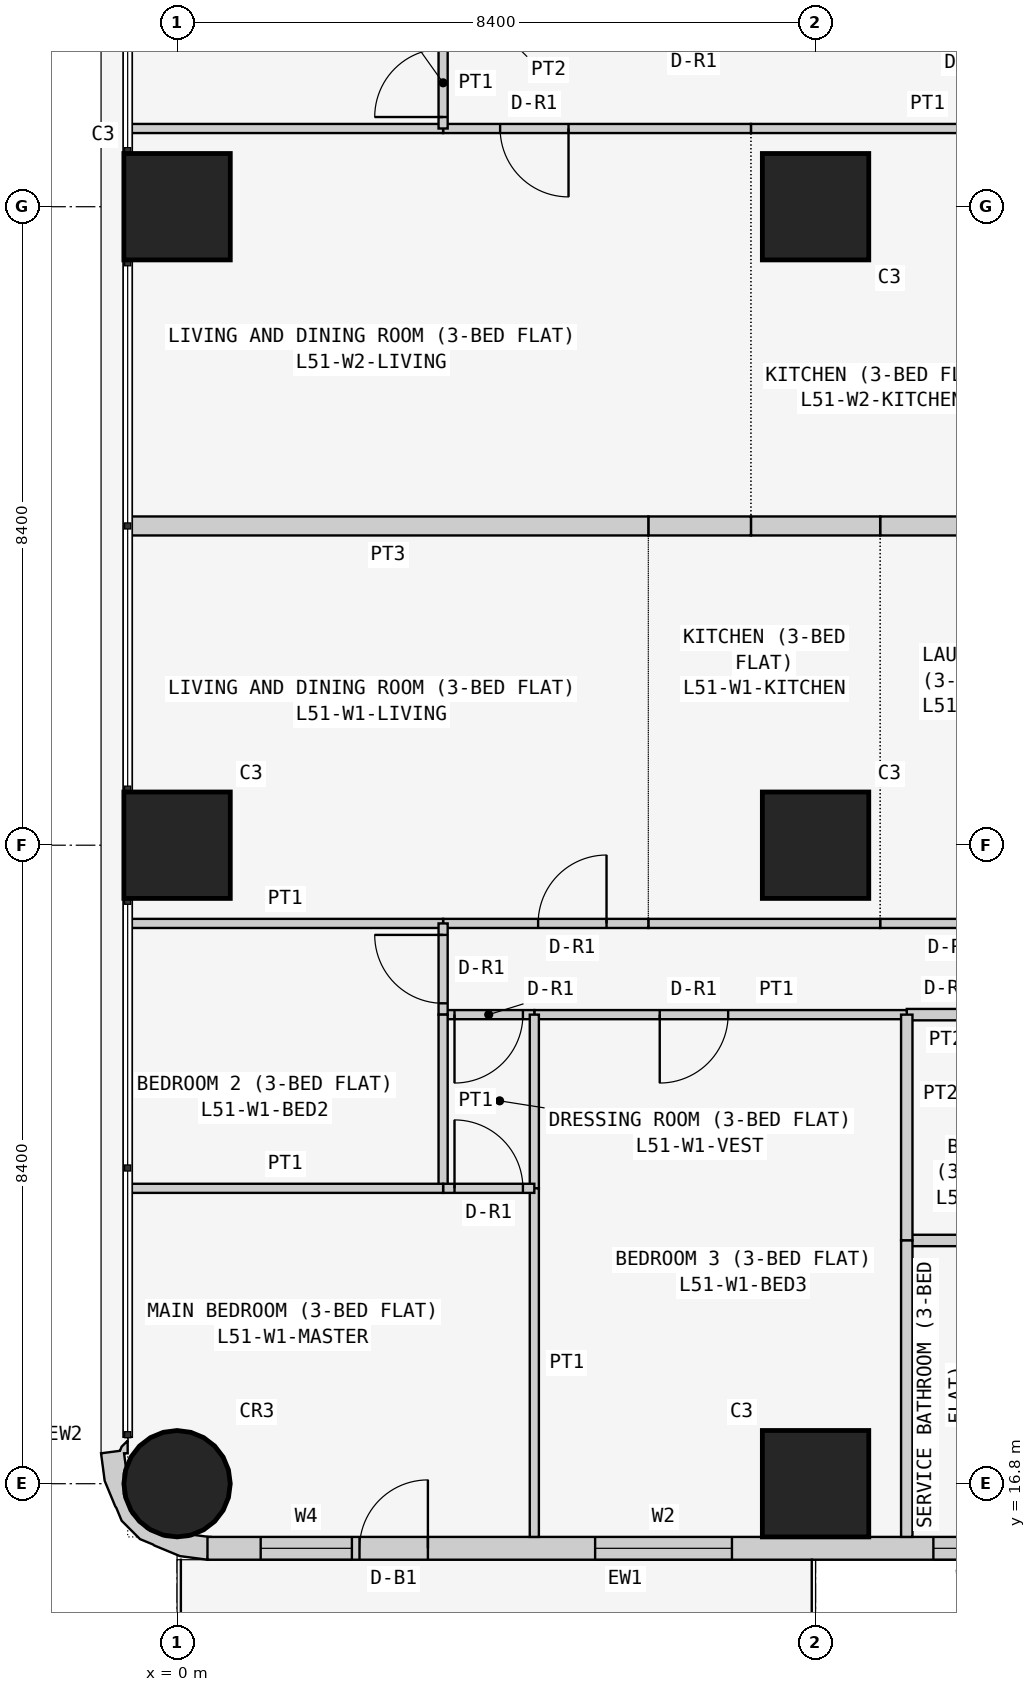
"""IFC4 building model, lengths in metres.
Left out: names, types, materials, properties, quantities, classifications, styles, units other than length and angle.
Written with IfcOpenShell. Run it as: python <this file> out.ifc"""

import sys

from ifc_helpers import new_model, si_unit, direction, frame, frame_2d, origin, origin_2d, place, context, subcontext, project, spatial, polyline, rectangle, circle, outline, extrude, element, fill, save


model = new_model("IFC4")
c1 = context("Model", 3, precision=1e-05, world=origin(), true_north=direction((0.0, 1.0)))
c2 = subcontext(c1, "Body", "Model", "MODEL_VIEW")
j1 = project(units=[si_unit("LENGTHUNIT", "METRE"), si_unit("PLANEANGLEUNIT", "RADIAN")], contexts=[c1])
p1 = place(None, origin())
s1 = spatial("IfcSite", under=j1, at=p1, CompositionType="ELEMENT")
p2 = place(p1, origin())
s2 = spatial("IfcBuilding", under=s1, at=p2, CompositionType="ELEMENT")
p3 = place(p2, frame((0.0, 0.0, 197.7)))
s3 = spatial("IfcBuildingStorey", under=s2, at=p3, CompositionType="ELEMENT", Elevation=197.7)
p4 = place(p3, frame((0.0, 16.8, 0.0), z_axis=(0.0, 0.0, 1.0), x_axis=(1.0, 0.0, 0.0)))
e1 = element("IfcColumn", 1, at=p4, inside=s3, PredefinedType="COLUMN", context=c2, shape_type="SweptSolid", body=[
    extrude(circle(Radius=0.7, at=origin_2d()), origin(), (0.0, 0.0, 1.0), 3.6),
])
for number, where, z_axis, x_axis in (
    (2, (0.0, 25.2, 0.0), (0.0, 0.0, 1.0), (1.0, 0.0, 0.0)),
    (3, (0.0, 33.6, 0.0), (0.0, 0.0, 1.0), (1.0, 0.0, 0.0)),
    (4, (8.4, 16.8, 0.0), (0.0, 0.0, 1.0), (1.0, 0.0, 0.0)),
    (5, (8.4, 25.2, 0.0), (0.0, 0.0, 1.0), (1.0, 0.0, 0.0)),
    (6, (8.4, 33.6, 0.0), (0.0, 0.0, 1.0), (1.0, 0.0, 0.0)),
):
    element("IfcColumn", number, at=place(p3, frame(where, z_axis=z_axis, x_axis=x_axis)), inside=s3, PredefinedType="COLUMN", context=c2, shape_type="SweptSolid", body=[
        extrude(rectangle(XDim=1.4, YDim=1.4, at=origin_2d()), origin(), (0.0, 0.0, 1.0), 3.6),
    ])
p5 = place(p3, frame((0.4, 15.95, 0.0), z_axis=(0.0, 0.0, 1.0), x_axis=(1.0, 0.0, 0.0)))
e7 = element("IfcWall", 7, at=p5, inside=s3, PredefinedType="SOLIDWALL", context=c2, shape_type="SweptSolid", body=[
    extrude(rectangle(XDim=15.7, YDim=0.3, at=frame_2d((7.85, 0.0))), origin(), (0.0, 0.0, 1.0), 3.45),
])
p6 = place(p5, frame((12.4, 0.0, 0.9)))
e8 = element("IfcOpeningElement", 8, at=p6, cuts=e7, PredefinedType="OPENING", context=c2, shape_type="SweptSolid", body=[
    extrude(rectangle(XDim=1.8, YDim=1.5, at=frame_2d((0.9, 0.75))), frame((0.0, 0.16, 0.0), z_axis=(0.0, -1.0, 0.0), x_axis=(1.0, 0.0, 0.0)), (0.0, 0.0, 1.0), 0.32),
])
p7 = place(p5, frame((9.55, 0.0, 1.5)))
e9 = element("IfcOpeningElement", 9, at=p7, cuts=e7, PredefinedType="OPENING", context=c2, shape_type="SweptSolid", body=[
    extrude(rectangle(XDim=0.9, YDim=0.7, at=frame_2d((0.45, 0.35))), frame((0.0, 0.16, 0.0), z_axis=(0.0, -1.0, 0.0), x_axis=(1.0, 0.0, 0.0)), (0.0, 0.0, 1.0), 0.32),
])
p8 = place(p5, frame((5.1, 0.0, 0.9)))
e10 = element("IfcOpeningElement", 10, at=p8, cuts=e7, PredefinedType="OPENING", context=c2, shape_type="SweptSolid", body=[
    extrude(rectangle(XDim=1.8, YDim=1.5, at=frame_2d((0.9, 0.75))), frame((0.0, 0.16, 0.0), z_axis=(0.0, -1.0, 0.0), x_axis=(1.0, 0.0, 0.0)), (0.0, 0.0, 1.0), 0.32),
])
p9 = place(p5, frame((2.0, 0.0, 0.0)))
e11 = element("IfcOpeningElement", 11, at=p9, cuts=e7, PredefinedType="OPENING", context=c2, shape_type="SweptSolid", body=[
    extrude(rectangle(XDim=0.9, YDim=2.4, at=frame_2d((0.45, 1.2))), frame((0.0, 0.16, 0.0), z_axis=(0.0, -1.0, 0.0), x_axis=(1.0, 0.0, 0.0)), (0.0, 0.0, 1.0), 0.32),
])
p10 = place(p5, frame((0.7, 0.0, 0.9)))
e12 = element("IfcOpeningElement", 12, at=p10, cuts=e7, PredefinedType="OPENING", context=c2, shape_type="SweptSolid", body=[
    extrude(rectangle(XDim=1.2, YDim=1.5, at=frame_2d((0.6, 0.75))), frame((0.0, 0.16, 0.0), z_axis=(0.0, -1.0, 0.0), x_axis=(1.0, 0.0, 0.0)), (0.0, 0.0, 1.0), 0.32),
])
p11 = place(p3, frame((-0.588, 17.312, 0.0), z_axis=(0.0, 0.0, 1.0), x_axis=(-0.898030234854, -0.439933741929, 0.0)))
e13 = element("IfcWall", 13, at=p11, inside=s3, PredefinedType="SOLIDWALL", context=c2, shape_type="SweptSolid", body=[
    extrude(outline(polyline([(-0.222, 1.793), (-0.39, 1.541), (-0.372, 1.532), (-0.195, 1.415), (-0.12, 1.41), (0.131, 1.287), (0.315, 1.078), (0.406, 0.814), (0.388, 0.536), (0.265, 0.285), (0.209, 0.236), (0.148, 0.053), (0.105, 0.074), (0.032, -0.076), (0.138, -0.039), (0.182, -0.0), (0.419, -0.08), (0.536, 0.266), (0.559, 0.631), (0.555, 0.651), (0.566, 0.836), (0.456, 1.159), (0.333, 1.298), (0.324, 1.316), (0.082, 1.591), (-0.222, 1.793)])), origin(), (0.0, 0.0, 1.0), 3.45),
])
p12 = place(p3, frame((9.25, 24.171, 0.0), z_axis=(0.0, 0.0, 1.0), x_axis=(1.0, 0.0, 0.0)))
e14 = element("IfcWall", 14, at=p12, inside=s3, PredefinedType="PARTITIONING", context=c2, shape_type="SweptSolid", body=[
    extrude(rectangle(XDim=2.95, YDim=0.12, at=frame_2d((1.475, 0.0))), origin(), (0.0, 0.0, 1.0), 3.45),
])
p13 = place(p12, frame((1.3, 0.0, 0.0)))
e15 = element("IfcOpeningElement", 15, at=p13, cuts=e14, PredefinedType="OPENING", context=c2, shape_type="SweptSolid", body=[
    extrude(rectangle(XDim=0.9, YDim=2.1, at=frame_2d((0.45, 1.05))), frame((0.0, 0.07, 0.0), z_axis=(0.0, -1.0, 0.0), x_axis=(1.0, 0.0, 0.0)), (0.0, 0.0, 1.0), 0.14),
])
p14 = place(p3, frame((12.2, 29.4, 0.0), z_axis=(0.0, 0.0, 1.0), x_axis=(-1.0, 0.0, 0.0)))
e16 = element("IfcWall", 16, at=p14, inside=s3, PredefinedType="PARTITIONING", context=c2, shape_type="SweptSolid", body=[
    extrude(rectangle(XDim=2.95, YDim=0.25, at=frame_2d((1.475, 0.0))), origin(), (0.0, 0.0, 1.0), 3.45),
])
p15 = place(p3, frame((6.2, 24.171, 0.0), z_axis=(0.0, 0.0, 1.0), x_axis=(1.0, 0.0, 0.0)))
e17 = element("IfcWall", 17, at=p15, inside=s3, PredefinedType="PARTITIONING", context=c2, shape_type="SweptSolid", body=[
    extrude(rectangle(XDim=3.05, YDim=0.12, at=frame_2d((1.525, 0.0))), origin(), (0.0, 0.0, 1.0), 3.45),
])
p16 = place(p3, frame((9.25, 29.4, 0.0), z_axis=(0.0, 0.0, 1.0), x_axis=(-1.0, 0.0, 0.0)))
e18 = element("IfcWall", 18, at=p16, inside=s3, PredefinedType="PARTITIONING", context=c2, shape_type="SweptSolid", body=[
    extrude(rectangle(XDim=1.7, YDim=0.25, at=frame_2d((0.85, 0.0))), origin(), (0.0, 0.0, 1.0), 3.45),
])
p17 = place(p3, frame((7.55, 29.4, 0.0), z_axis=(0.0, 0.0, 1.0), x_axis=(-1.0, 0.0, 0.0)))
e19 = element("IfcWall", 19, at=p17, inside=s3, PredefinedType="PARTITIONING", context=c2, shape_type="SweptSolid", body=[
    extrude(rectangle(XDim=1.35, YDim=0.25, at=frame_2d((0.675, 0.0))), origin(), (0.0, 0.0, 1.0), 3.45),
])
p18 = place(p3, frame((3.5, 24.171, 0.0), z_axis=(0.0, 0.0, 1.0), x_axis=(1.0, 0.0, 0.0)))
e20 = element("IfcWall", 20, at=p18, inside=s3, PredefinedType="PARTITIONING", context=c2, shape_type="SweptSolid", body=[
    extrude(rectangle(XDim=2.7, YDim=0.12, at=frame_2d((1.35, 0.0))), origin(), (0.0, 0.0, 1.0), 3.45),
])
p19 = place(p18, frame((1.25, 0.0, 0.0)))
e21 = element("IfcOpeningElement", 21, at=p19, cuts=e20, PredefinedType="OPENING", context=c2, shape_type="SweptSolid", body=[
    extrude(rectangle(XDim=0.9, YDim=2.1, at=frame_2d((0.45, 1.05))), frame((0.0, 0.07, 0.0), z_axis=(0.0, -1.0, 0.0), x_axis=(1.0, 0.0, 0.0)), (0.0, 0.0, 1.0), 0.14),
])
p20 = place(p3, frame((-0.65, 24.171, 0.0), z_axis=(0.0, 0.0, 1.0), x_axis=(1.0, 0.0, 0.0)))
e22 = element("IfcWall", 22, at=p20, inside=s3, PredefinedType="PARTITIONING", context=c2, shape_type="SweptSolid", body=[
    extrude(rectangle(XDim=4.15, YDim=0.12, at=frame_2d((2.075, 0.0))), origin(), (0.0, 0.0, 1.0), 3.45),
])
p21 = place(p3, frame((6.2, 29.4, 0.0), z_axis=(0.0, 0.0, 1.0), x_axis=(-1.0, 0.0, 0.0)))
e23 = element("IfcWall", 23, at=p21, inside=s3, PredefinedType="PARTITIONING", context=c2, shape_type="SweptSolid", body=[
    extrude(rectangle(XDim=6.85, YDim=0.25, at=frame_2d((3.425, 0.0))), origin(), (0.0, 0.0, 1.0), 3.45),
])
p22 = place(p3, frame((9.6, 22.971, 0.0), z_axis=(0.0, 0.0, 1.0), x_axis=(1.0, 0.0, 0.0)))
e24 = element("IfcWall", 24, at=p22, inside=s3, PredefinedType="PARTITIONING", context=c2, shape_type="SweptSolid", body=[
    extrude(rectangle(XDim=2.6, YDim=0.15, at=frame_2d((1.3, 0.0))), origin(), (0.0, 0.0, 1.0), 3.45),
])
p23 = place(p22, frame((0.9, 0.0, 0.0)))
e25 = element("IfcOpeningElement", 25, at=p23, cuts=e24, PredefinedType="OPENING", context=c2, shape_type="SweptSolid", body=[
    extrude(rectangle(XDim=0.8, YDim=2.1, at=frame_2d((0.4, 1.05))), frame((0.0, 0.085, 0.0), z_axis=(0.0, -1.0, 0.0), x_axis=(1.0, 0.0, 0.0)), (0.0, 0.0, 1.0), 0.17),
])
p24 = place(p3, frame((4.7, 22.971, 0.0), z_axis=(0.0, 0.0, 1.0), x_axis=(1.0, 0.0, 0.0)))
e26 = element("IfcWall", 26, at=p24, inside=s3, PredefinedType="PARTITIONING", context=c2, shape_type="SweptSolid", body=[
    extrude(rectangle(XDim=4.9, YDim=0.12, at=frame_2d((2.45, 0.0))), origin(), (0.0, 0.0, 1.0), 3.45),
])
p25 = place(p24, frame((1.65, 0.0, 0.0)))
e27 = element("IfcOpeningElement", 27, at=p25, cuts=e26, PredefinedType="OPENING", context=c2, shape_type="SweptSolid", body=[
    extrude(rectangle(XDim=0.9, YDim=2.1, at=frame_2d((0.45, 1.05))), frame((0.0, 0.07, 0.0), z_axis=(0.0, -1.0, 0.0), x_axis=(1.0, 0.0, 0.0)), (0.0, 0.0, 1.0), 0.14),
])
p26 = place(p3, frame((3.5, 22.971, 0.0), z_axis=(0.0, 0.0, 1.0), x_axis=(1.0, 0.0, 0.0)))
e28 = element("IfcWall", 28, at=p26, inside=s3, PredefinedType="PARTITIONING", context=c2, shape_type="SweptSolid", body=[
    extrude(rectangle(XDim=1.2, YDim=0.12, at=frame_2d((0.6, 0.0))), origin(), (0.0, 0.0, 1.0), 3.45),
])
p27 = place(p26, frame((0.15, 0.0, 0.0)))
e29 = element("IfcOpeningElement", 29, at=p27, cuts=e28, PredefinedType="OPENING", context=c2, shape_type="SweptSolid", body=[
    extrude(rectangle(XDim=0.9, YDim=2.1, at=frame_2d((0.45, 1.05))), frame((0.0, 0.07, 0.0), z_axis=(0.0, -1.0, 0.0), x_axis=(1.0, 0.0, 0.0)), (0.0, 0.0, 1.0), 0.14),
])
p28 = place(p3, frame((3.5, 24.171, 0.0), z_axis=(0.0, 0.0, 1.0), x_axis=(0.0, -1.0, 0.0)))
e30 = element("IfcWall", 30, at=p28, inside=s3, PredefinedType="PARTITIONING", context=c2, shape_type="SweptSolid", body=[
    extrude(rectangle(XDim=1.2, YDim=0.12, at=frame_2d((0.6, 0.0))), origin(), (0.0, 0.0, 1.0), 3.45),
])
p29 = place(p28, frame((0.151, 0.0, 0.0)))
e31 = element("IfcOpeningElement", 31, at=p29, cuts=e30, PredefinedType="OPENING", context=c2, shape_type="SweptSolid", body=[
    extrude(rectangle(XDim=0.9, YDim=2.1, at=frame_2d((0.45, 1.05))), frame((0.0, 0.07, 0.0), z_axis=(0.0, -1.0, 0.0), x_axis=(1.0, 0.0, 0.0)), (0.0, 0.0, 1.0), 0.14),
])
p30 = place(p3, frame((9.6, 20.0, 0.0), z_axis=(0.0, 0.0, 1.0), x_axis=(1.0, 0.0, 0.0)))
e32 = element("IfcWall", 32, at=p30, inside=s3, PredefinedType="PARTITIONING", context=c2, shape_type="SweptSolid", body=[
    extrude(rectangle(XDim=2.6, YDim=0.15, at=frame_2d((1.3, 0.0))), origin(), (0.0, 0.0, 1.0), 3.45),
])
p31 = place(p3, frame((9.6, 22.971, 0.0), z_axis=(0.0, 0.0, 1.0), x_axis=(0.0, -1.0, 0.0)))
e33 = element("IfcWall", 33, at=p31, inside=s3, PredefinedType="PARTITIONING", context=c2, shape_type="SweptSolid", body=[
    extrude(rectangle(XDim=2.971, YDim=0.15, at=frame_2d((1.485, 0.0))), origin(), (0.0, 0.0, 1.0), 3.45),
])
p32 = place(p3, frame((9.6, 20.0, 0.0), z_axis=(0.0, 0.0, 1.0), x_axis=(0.0, -1.0, 0.0)))
e34 = element("IfcWall", 34, at=p32, inside=s3, PredefinedType="PARTITIONING", context=c2, shape_type="SweptSolid", body=[
    extrude(rectangle(XDim=3.9, YDim=0.15, at=frame_2d((1.95, 0.0))), origin(), (0.0, 0.0, 1.0), 3.45),
])
p33 = place(p3, frame((4.7, 22.971, 0.0), z_axis=(0.0, 0.0, 1.0), x_axis=(0.0, -1.0, 0.0)))
e35 = element("IfcWall", 35, at=p33, inside=s3, PredefinedType="PARTITIONING", context=c2, shape_type="SweptSolid", body=[
    extrude(rectangle(XDim=2.285, YDim=0.12, at=frame_2d((1.143, 0.0))), origin(), (0.0, 0.0, 1.0), 3.45),
])
p34 = place(p3, frame((4.7, 20.686, 0.0), z_axis=(0.0, 0.0, 1.0), x_axis=(0.0, -1.0, 0.0)))
e36 = element("IfcWall", 36, at=p34, inside=s3, PredefinedType="PARTITIONING", context=c2, shape_type="SweptSolid", body=[
    extrude(rectangle(XDim=4.586, YDim=0.12, at=frame_2d((2.293, 0.0))), origin(), (0.0, 0.0, 1.0), 3.45),
])
p35 = place(p3, frame((3.5, 22.971, 0.0), z_axis=(0.0, 0.0, 1.0), x_axis=(0.0, -1.0, 0.0)))
e37 = element("IfcWall", 37, at=p35, inside=s3, PredefinedType="PARTITIONING", context=c2, shape_type="SweptSolid", body=[
    extrude(rectangle(XDim=2.285, YDim=0.12, at=frame_2d((1.143, 0.0))), origin(), (0.0, 0.0, 1.0), 3.45),
])
p36 = place(p3, frame((3.5, 20.686, 0.0), z_axis=(0.0, 0.0, 1.0), x_axis=(1.0, 0.0, 0.0)))
e38 = element("IfcWall", 38, at=p36, inside=s3, PredefinedType="PARTITIONING", context=c2, shape_type="SweptSolid", body=[
    extrude(rectangle(XDim=1.2, YDim=0.12, at=frame_2d((0.6, 0.0))), origin(), (0.0, 0.0, 1.0), 3.45),
])
p37 = place(p36, frame((0.15, 0.0, 0.0)))
e39 = element("IfcOpeningElement", 39, at=p37, cuts=e38, PredefinedType="OPENING", context=c2, shape_type="SweptSolid", body=[
    extrude(rectangle(XDim=0.9, YDim=2.1, at=frame_2d((0.45, 1.05))), frame((0.0, 0.07, 0.0), z_axis=(0.0, -1.0, 0.0), x_axis=(1.0, 0.0, 0.0)), (0.0, 0.0, 1.0), 0.14),
])
p38 = place(p3, frame((-0.65, 20.686, 0.0), z_axis=(0.0, 0.0, 1.0), x_axis=(1.0, 0.0, 0.0)))
e40 = element("IfcWall", 40, at=p38, inside=s3, PredefinedType="PARTITIONING", context=c2, shape_type="SweptSolid", body=[
    extrude(rectangle(XDim=4.15, YDim=0.12, at=frame_2d((2.075, 0.0))), origin(), (0.0, 0.0, 1.0), 3.45),
])
p39 = place(p3, frame((7.55, 34.629, 0.0), z_axis=(0.0, 0.0, 1.0), x_axis=(1.0, 0.0, 0.0)))
e41 = element("IfcWall", 41, at=p39, inside=s3, PredefinedType="PARTITIONING", context=c2, shape_type="SweptSolid", body=[
    extrude(rectangle(XDim=4.65, YDim=0.12, at=frame_2d((2.325, 0.0))), origin(), (0.0, 0.0, 1.0), 3.45),
])
p40 = place(p3, frame((3.5, 34.629, 0.0), z_axis=(0.0, 0.0, 1.0), x_axis=(1.0, 0.0, 0.0)))
e42 = element("IfcWall", 42, at=p40, inside=s3, PredefinedType="PARTITIONING", context=c2, shape_type="SweptSolid", body=[
    extrude(rectangle(XDim=4.05, YDim=0.12, at=frame_2d((2.025, 0.0))), origin(), (0.0, 0.0, 1.0), 3.45),
])
p41 = place(p40, frame((0.75, 0.0, 0.0)))
e43 = element("IfcOpeningElement", 43, at=p41, cuts=e42, PredefinedType="OPENING", context=c2, shape_type="SweptSolid", body=[
    extrude(rectangle(XDim=0.9, YDim=2.1, at=frame_2d((0.45, 1.05))), frame((0.0, 0.07, 0.0), z_axis=(0.0, -1.0, 0.0), x_axis=(1.0, 0.0, 0.0)), (0.0, 0.0, 1.0), 0.14),
])
p42 = place(p3, frame((-0.65, 34.629, 0.0), z_axis=(0.0, 0.0, 1.0), x_axis=(1.0, 0.0, 0.0)))
e44 = element("IfcWall", 44, at=p42, inside=s3, PredefinedType="PARTITIONING", context=c2, shape_type="SweptSolid", body=[
    extrude(rectangle(XDim=4.15, YDim=0.12, at=frame_2d((2.075, 0.0))), origin(), (0.0, 0.0, 1.0), 3.45),
])
p43 = place(p3, frame((3.5, 34.629, 0.0), z_axis=(0.0, 0.0, 1.0), x_axis=(0.0, 1.0, 0.0)))
e45 = element("IfcWall", 45, at=p43, inside=s3, PredefinedType="PARTITIONING", context=c2, shape_type="SweptSolid", body=[
    extrude(rectangle(XDim=1.2, YDim=0.12, at=frame_2d((0.6, 0.0))), origin(), (0.0, 0.0, 1.0), 3.45),
])
p44 = place(p43, frame((0.151, 0.0, 0.0)))
e46 = element("IfcOpeningElement", 46, at=p44, cuts=e45, PredefinedType="OPENING", context=c2, shape_type="SweptSolid", body=[
    extrude(rectangle(XDim=0.9, YDim=2.1, at=frame_2d((0.45, 1.05))), frame((0.0, 0.07, 0.0), z_axis=(0.0, -1.0, 0.0), x_axis=(1.0, 0.0, 0.0)), (0.0, 0.0, 1.0), 0.14),
])
p45 = place(p7, origin())
e47 = element("IfcWindow", 47, at=p45, inside=s3, PartitioningType="SINGLE_PANEL", PredefinedType="WINDOW", context=c2, shape_type="SweptSolid", body=[
    extrude(rectangle(XDim=0.9, YDim=0.7, at=frame_2d((0.45, 0.35))), frame((0.0, 0.03, 0.0), z_axis=(0.0, -1.0, 0.0), x_axis=(1.0, 0.0, 0.0)), (0.0, 0.0, 1.0), 0.06),
])
fill(e9, e47)
p46 = place(p8, origin())
e48 = element("IfcWindow", 48, at=p46, inside=s3, PartitioningType="SINGLE_PANEL", PredefinedType="WINDOW", context=c2, shape_type="SweptSolid", body=[
    extrude(rectangle(XDim=1.8, YDim=1.5, at=frame_2d((0.9, 0.75))), frame((0.0, 0.03, 0.0), z_axis=(0.0, -1.0, 0.0), x_axis=(1.0, 0.0, 0.0)), (0.0, 0.0, 1.0), 0.06),
])
fill(e10, e48)
p47 = place(p9, origin())
e49 = element("IfcDoor", 49, at=p47, inside=s3, OperationType="SINGLE_SWING_RIGHT", PredefinedType="DOOR", context=c2, shape_type="SweptSolid", body=[
    extrude(rectangle(XDim=0.9, YDim=2.4, at=frame_2d((0.45, 1.2))), frame((0.0, 0.025, 0.0), z_axis=(0.0, -1.0, 0.0), x_axis=(1.0, 0.0, 0.0)), (0.0, 0.0, 1.0), 0.05),
])
fill(e11, e49)
p48 = place(p10, origin())
e50 = element("IfcWindow", 50, at=p48, inside=s3, PartitioningType="SINGLE_PANEL", PredefinedType="WINDOW", context=c2, shape_type="SweptSolid", body=[
    extrude(rectangle(XDim=1.2, YDim=1.5, at=frame_2d((0.6, 0.75))), frame((0.0, 0.03, 0.0), z_axis=(0.0, -1.0, 0.0), x_axis=(1.0, 0.0, 0.0)), (0.0, 0.0, 1.0), 0.06),
])
fill(e12, e50)
p49 = place(p19, origin())
e51 = element("IfcDoor", 51, at=p49, inside=s3, OperationType="SINGLE_SWING_RIGHT", PredefinedType="DOOR", context=c2, shape_type="SweptSolid", body=[
    extrude(rectangle(XDim=0.9, YDim=2.1, at=frame_2d((0.45, 1.05))), frame((0.0, 0.025, 0.0), z_axis=(0.0, -1.0, 0.0), x_axis=(1.0, 0.0, 0.0)), (0.0, 0.0, 1.0), 0.05),
])
fill(e21, e51)
p50 = place(p25, frame((0.9, 0.0, 0.0), z_axis=(0.0, 0.0, 1.0), x_axis=(-1.0, 0.0, 0.0)))
e52 = element("IfcDoor", 52, at=p50, inside=s3, OperationType="SINGLE_SWING_RIGHT", PredefinedType="DOOR", context=c2, shape_type="SweptSolid", body=[
    extrude(rectangle(XDim=0.9, YDim=2.1, at=frame_2d((0.45, 1.05))), frame((0.0, 0.025, 0.0), z_axis=(0.0, -1.0, 0.0), x_axis=(1.0, 0.0, 0.0)), (0.0, 0.0, 1.0), 0.05),
])
fill(e27, e52)
p51 = place(p27, frame((0.9, 0.0, 0.0), z_axis=(0.0, 0.0, 1.0), x_axis=(-1.0, 0.0, 0.0)))
e53 = element("IfcDoor", 53, at=p51, inside=s3, OperationType="SINGLE_SWING_RIGHT", PredefinedType="DOOR", context=c2, shape_type="SweptSolid", body=[
    extrude(rectangle(XDim=0.9, YDim=2.1, at=frame_2d((0.45, 1.05))), frame((0.0, 0.025, 0.0), z_axis=(0.0, -1.0, 0.0), x_axis=(1.0, 0.0, 0.0)), (0.0, 0.0, 1.0), 0.05),
])
fill(e29, e53)
p52 = place(p37, origin())
e54 = element("IfcDoor", 54, at=p52, inside=s3, OperationType="SINGLE_SWING_LEFT", PredefinedType="DOOR", context=c2, shape_type="SweptSolid", body=[
    extrude(rectangle(XDim=0.9, YDim=2.1, at=frame_2d((0.45, 1.05))), frame((0.0, 0.025, 0.0), z_axis=(0.0, -1.0, 0.0), x_axis=(1.0, 0.0, 0.0)), (0.0, 0.0, 1.0), 0.05),
])
fill(e39, e54)
p53 = place(p29, frame((0.9, 0.0, 0.0), z_axis=(0.0, 0.0, 1.0), x_axis=(-1.0, 0.0, 0.0)))
e55 = element("IfcDoor", 55, at=p53, inside=s3, OperationType="SINGLE_SWING_RIGHT", PredefinedType="DOOR", context=c2, shape_type="SweptSolid", body=[
    extrude(rectangle(XDim=0.9, YDim=2.1, at=frame_2d((0.45, 1.05))), frame((0.0, 0.025, 0.0), z_axis=(0.0, -1.0, 0.0), x_axis=(1.0, 0.0, 0.0)), (0.0, 0.0, 1.0), 0.05),
])
fill(e31, e55)
p54 = place(p41, frame((0.9, 0.0, 0.0), z_axis=(0.0, 0.0, 1.0), x_axis=(-1.0, 0.0, 0.0)))
e56 = element("IfcDoor", 56, at=p54, inside=s3, OperationType="SINGLE_SWING_LEFT", PredefinedType="DOOR", context=c2, shape_type="SweptSolid", body=[
    extrude(rectangle(XDim=0.9, YDim=2.1, at=frame_2d((0.45, 1.05))), frame((0.0, 0.025, 0.0), z_axis=(0.0, -1.0, 0.0), x_axis=(1.0, 0.0, 0.0)), (0.0, 0.0, 1.0), 0.05),
])
fill(e43, e56)
p55 = place(p44, origin())
e57 = element("IfcDoor", 57, at=p55, inside=s3, OperationType="SINGLE_SWING_LEFT", PredefinedType="DOOR", context=c2, shape_type="SweptSolid", body=[
    extrude(rectangle(XDim=0.9, YDim=2.1, at=frame_2d((0.45, 1.05))), frame((0.0, 0.025, 0.0), z_axis=(0.0, -1.0, 0.0), x_axis=(1.0, 0.0, 0.0)), (0.0, 0.0, 1.0), 0.05),
])
fill(e46, e57)
save(model, sys.argv[1])
